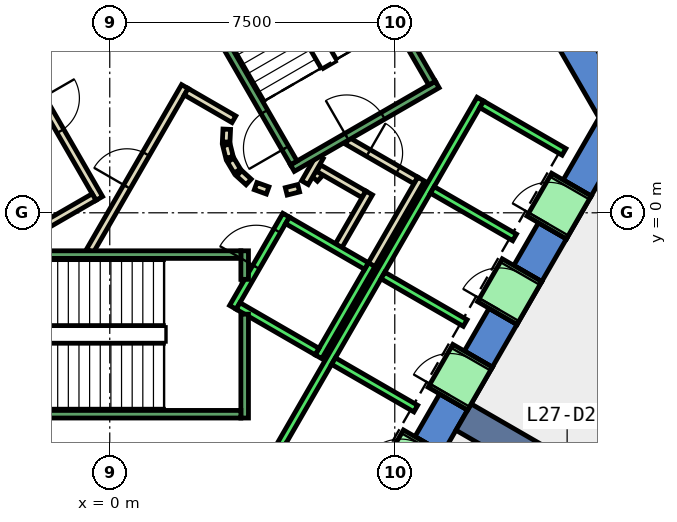
"""IFC4 building model, lengths in metres.
Left out: names, types, materials, properties, quantities, classifications, styles, units other than length and angle.
Written with IfcOpenShell. Run it as: python <this file> out.ifc"""

import sys

from ifc_helpers import new_model, si_unit, direction, frame, frame_2d, origin, place, context, subcontext, project, spatial, polyline, rectangle, outline, extrude, element, fill, save


model = new_model("IFC4")
c1 = context("Model", 3, precision=1e-05, world=origin(), true_north=direction((0.0, 1.0)))
c2 = subcontext(c1, "Body", "Model", "MODEL_VIEW")
j1 = project(units=[si_unit("LENGTHUNIT", "METRE"), si_unit("PLANEANGLEUNIT", "RADIAN")], contexts=[c1])
p1 = place(None, origin())
s1 = spatial("IfcSite", under=j1, at=p1, CompositionType="ELEMENT")
p2 = place(p1, origin())
s2 = spatial("IfcBuilding", under=s1, at=p2, CompositionType="ELEMENT")
p3 = place(p2, frame((0.0, 0.0, 124.4)))
s3 = spatial("IfcBuildingStorey", under=s2, at=p3, CompositionType="ELEMENT", Elevation=124.4)
p4 = place(p3, frame((0.0, 0.0, -0.4)))
e1 = element("IfcWall", 1, at=p4, inside=s3, PredefinedType="SHEAR", context=c2, shape_type="SweptSolid", body=[
    extrude(outline(polyline([(8.517, 11.748), (7.781, 11.323), (12.875, 2.5), (13.856, 2.5), (8.517, 11.748)])), origin(), (0.0, 0.0, 1.0), 4.2),
])
p5 = place(p3, frame((0.0, 0.0, -0.4)))
e2 = element("IfcWall", 2, at=p5, inside=s3, PredefinedType="SHEAR", context=c2, shape_type="SweptSolid", body=[
    extrude(outline(polyline([(9.417, -5.189), (8.681, -4.764), (8.031, -5.889), (8.767, -6.314), (9.417, -5.189)])), origin(), (0.0, 0.0, 1.0), 4.2),
])
p6 = place(p3, frame((0.0, 0.0, -0.4)))
e3 = element("IfcWall", 3, at=p6, inside=s3, PredefinedType="SHEAR", context=c2, shape_type="SweptSolid", body=[
    extrude(outline(polyline([(10.717, -2.937), (9.981, -2.512), (9.331, -3.638), (10.067, -4.063), (10.717, -2.937)])), origin(), (0.0, 0.0, 1.0), 4.2),
])
p7 = place(p3, frame((0.0, 0.0, -0.4)))
e4 = element("IfcWall", 4, at=p7, inside=s3, PredefinedType="SHEAR", context=c2, shape_type="SweptSolid", body=[
    extrude(outline(polyline([(12.017, -0.686), (11.281, -0.261), (10.631, -1.386), (11.367, -1.811), (12.017, -0.686)])), origin(), (0.0, 0.0, 1.0), 4.2),
])
p8 = place(p3, frame((0.0, 0.0, -0.4)))
e5 = element("IfcWall", 5, at=p8, inside=s3, PredefinedType="SHEAR", context=c2, shape_type="SweptSolid", body=[
    extrude(outline(polyline([(11.931, 0.865), (12.667, 0.44), (13.856, 2.5), (12.875, 2.5), (11.931, 0.865)])), origin(), (0.0, 0.0, 1.0), 4.2),
])
p9 = place(p3, frame((0.0, 0.0, 3.6)))
e6 = element("IfcWall", 6, at=p9, inside=s3, PredefinedType="SHEAR", context=c2, shape_type="SweptSolid", body=[
    extrude(outline(polyline([(8.767, -6.314), (8.031, -5.889), (7.381, -7.015), (8.117, -7.44), (8.767, -6.314)])), origin(), (0.0, 0.0, 1.0), 0.2),
])
p10 = place(p3, frame((0.0, 0.0, 3.6)))
e7 = element("IfcWall", 7, at=p10, inside=s3, PredefinedType="SHEAR", context=c2, shape_type="SweptSolid", body=[
    extrude(outline(polyline([(10.067, -4.063), (9.331, -3.638), (8.681, -4.764), (9.417, -5.189), (10.067, -4.063)])), origin(), (0.0, 0.0, 1.0), 0.2),
])
p11 = place(p3, frame((0.0, 0.0, 3.6)))
e8 = element("IfcWall", 8, at=p11, inside=s3, PredefinedType="SHEAR", context=c2, shape_type="SweptSolid", body=[
    extrude(outline(polyline([(11.367, -1.811), (10.631, -1.386), (9.981, -2.512), (10.717, -2.937), (11.367, -1.811)])), origin(), (0.0, 0.0, 1.0), 0.2),
])
p12 = place(p3, frame((0.0, 0.0, 3.6)))
e9 = element("IfcWall", 9, at=p12, inside=s3, PredefinedType="SHEAR", context=c2, shape_type="SweptSolid", body=[
    extrude(outline(polyline([(12.667, 0.44), (11.931, 0.865), (11.281, -0.261), (12.017, -0.686), (12.667, 0.44)])), origin(), (0.0, 0.0, 1.0), 0.2),
])
p13 = place(p3, frame((9.31, -5.375, -0.4), z_axis=(0.0, 0.0, 1.0), x_axis=(0.866017533419, -0.500013631625, 0.0)))
e10 = element("IfcWall", 10, at=p13, inside=s3, PredefinedType="SHEAR", context=c2, shape_type="SweptSolid", body=[
    extrude(rectangle(XDim=9.0, YDim=0.8, at=frame_2d((4.5, 0.0))), origin(), (0.0, 0.0, 1.0), 4.2),
])
p14 = place(p3, frame((5.39, 0.898, 0.0), z_axis=(0.0, 0.0, 1.0), x_axis=(0.673828488714, 0.738887791073, 0.0)))
e11 = element("IfcWall", 11, at=p14, inside=s3, PredefinedType="PARTITIONING", context=c2, shape_type="SweptSolid", body=[
    extrude(rectangle(XDim=0.263, YDim=0.2, at=frame_2d((0.131, 0.0))), origin(), (0.0, 0.0, 1.0), 3.8),
])
p15 = place(p3, frame((5.499, 1.172, 0.0), z_axis=(0.0, 0.0, 1.0), x_axis=(0.866333505267, -0.499465972466, 0.0)))
e12 = element("IfcWall", 12, at=p15, inside=s3, PredefinedType="PARTITIONING", context=c2, shape_type="SweptSolid", body=[
    extrude(rectangle(XDim=1.374, YDim=0.2, at=frame_2d((0.687, 0.0))), origin(), (0.0, 0.0, 1.0), 3.8),
])
p16 = place(p3, frame((6.826, 0.522, 0.0), z_axis=(0.0, 0.0, 1.0), x_axis=(-0.500016722714, -0.866015748706, 0.0)))
e13 = element("IfcWall", 13, at=p16, inside=s3, PredefinedType="PARTITIONING", context=c2, shape_type="SweptSolid", body=[
    extrude(rectangle(XDim=1.7, YDim=0.2, at=frame_2d((0.85, 0.0))), origin(), (0.0, 0.0, 1.0), 3.8),
])
p17 = place(p3, frame((6.25, 1.894, 0.0), z_axis=(0.0, 0.0, 1.0), x_axis=(0.866043184279, -0.499969202016, 0.0)))
e14 = element("IfcWall", 14, at=p17, inside=s3, PredefinedType="PARTITIONING", context=c2, shape_type="SweptSolid", body=[
    extrude(rectangle(XDim=2.084, YDim=0.2, at=frame_2d((1.042, 0.0))), origin(), (0.0, 0.0, 1.0), 3.8),
])
p18 = place(p17, frame((0.642, 0.0, 0.0)))
e15 = element("IfcOpeningElement", 15, at=p18, cuts=e14, PredefinedType="OPENING", context=c2, shape_type="SweptSolid", body=[
    extrude(rectangle(XDim=0.9, YDim=2.1, at=frame_2d((0.45, 1.05))), frame((0.0, 0.11, 0.0), z_axis=(0.0, -1.0, 0.0), x_axis=(1.0, 0.0, 0.0)), (0.0, 0.0, 1.0), 0.22),
])
p19 = place(p3, frame((8.192, 0.888, 0.0), z_axis=(0.0, 0.0, 1.0), x_axis=(-0.499940625693, -0.866059680843, 0.0)))
e16 = element("IfcWall", 16, at=p19, inside=s3, PredefinedType="PARTITIONING", context=c2, shape_type="SweptSolid", body=[
    extrude(rectangle(XDim=2.68, YDim=0.2, at=frame_2d((1.34, 0.0))), origin(), (0.0, 0.0, 1.0), 3.8),
])
p20 = place(p3, frame((5.135, 0.793, 0.0), z_axis=(0.0, 0.0, 1.0), x_axis=(0.499526442893, 0.866298639529, 0.0)))
e17 = element("IfcWall", 17, at=p20, inside=s3, PredefinedType="PARTITIONING", context=c2, shape_type="SweptSolid", body=[
    extrude(rectangle(XDim=0.791, YDim=0.2, at=frame_2d((0.396, 0.0))), origin(), (0.0, 0.0, 1.0), 3.8),
])
p21 = place(p3, frame((-0.52, -1.0, 0.0), z_axis=(0.0, 0.0, 1.0), x_axis=(0.50011622646, 0.865958290007, 0.0)))
e18 = element("IfcWall", 18, at=p21, inside=s3, PredefinedType="PARTITIONING", context=c2, shape_type="SweptSolid", body=[
    extrude(rectangle(XDim=4.991, YDim=0.2, at=frame_2d((2.496, 0.0))), origin(), (0.0, 0.0, 1.0), 3.8),
])
p22 = place(p21, frame((1.945, 0.0, 0.0)))
e19 = element("IfcOpeningElement", 19, at=p22, cuts=e18, PredefinedType="OPENING", context=c2, shape_type="SweptSolid", body=[
    extrude(rectangle(XDim=1.0, YDim=2.1, at=frame_2d((0.5, 1.05))), frame((0.0, 0.11, 0.0), z_axis=(0.0, -1.0, 0.0), x_axis=(1.0, 0.0, 0.0)), (0.0, 0.0, 1.0), 0.22),
])
p23 = place(p3, frame((2.012, 3.186, 0.0), z_axis=(0.0, 0.0, 1.0), x_axis=(0.865891012941, -0.500232699559, 0.0)))
e20 = element("IfcWall", 20, at=p23, inside=s3, PredefinedType="PARTITIONING", context=c2, shape_type="SweptSolid", body=[
    extrude(rectangle(XDim=1.449, YDim=0.2, at=frame_2d((0.725, 0.0))), origin(), (0.0, 0.0, 1.0), 3.8),
])
p24 = place(p3, frame((3.079, 2.199, 0.0), z_axis=(0.0, 0.0, 1.0), x_axis=(-0.047771483479, -0.998858290933, 0.0)))
e21 = element("IfcWall", 21, at=p24, inside=s3, PredefinedType="PARTITIONING", context=c2, shape_type="SweptSolid", body=[
    extrude(rectangle(XDim=0.337, YDim=0.2, at=frame_2d((0.169, 0.0))), origin(), (0.0, 0.0, 1.0), 3.8),
])
p25 = place(p3, frame((3.07, 1.786, 0.0), z_axis=(0.0, 0.0, 1.0), x_axis=(0.242705583207, -0.970099994784, 0.0)))
e22 = element("IfcWall", 22, at=p25, inside=s3, PredefinedType="PARTITIONING", context=c2, shape_type="SweptSolid", body=[
    extrude(rectangle(XDim=0.338, YDim=0.2, at=frame_2d((0.169, 0.0))), origin(), (0.0, 0.0, 1.0), 3.8),
])
for number, where, z_axis, x_axis in (
    (23, (3.182, 1.388, 0.0), (0.0, 0.0, 1.0), (0.512, -0.859, 0.0)),
    (24, (3.404, 1.039, 0.0), (0.0, 0.0, 1.0), (0.74, -0.672, 0.0)),
):
    element("IfcWall", number, at=place(p3, frame(where, z_axis=z_axis, x_axis=x_axis)), inside=s3, PredefinedType="PARTITIONING", context=c2, shape_type="SweptSolid", body=[
        extrude(rectangle(XDim=0.338, YDim=0.2, at=frame_2d((0.169, 0.0))), origin(), (0.0, 0.0, 1.0), 3.8),
    ])
p26 = place(p3, frame((3.838, 0.702, 0.0), z_axis=(0.0, 0.0, 1.0), x_axis=(0.941035081519, -0.338308993895, 0.0)))
e25 = element("IfcWall", 25, at=p26, inside=s3, PredefinedType="PARTITIONING", context=c2, shape_type="SweptSolid", body=[
    extrude(rectangle(XDim=0.337, YDim=0.2, at=frame_2d((0.168, 0.0))), origin(), (0.0, 0.0, 1.0), 3.8),
])
p27 = place(p3, frame((4.644, 0.564, 0.0), z_axis=(0.0, 0.0, 1.0), x_axis=(0.969929076366, 0.243387729394, 0.0)))
e26 = element("IfcWall", 26, at=p27, inside=s3, PredefinedType="PARTITIONING", context=c2, shape_type="SweptSolid", body=[
    extrude(rectangle(XDim=0.337, YDim=0.2, at=frame_2d((0.168, 0.0))), origin(), (0.0, 0.0, 1.0), 3.8),
])
p28 = place(p3, frame((-2.771, 4.7, 0.0), z_axis=(0.0, 0.0, 1.0), x_axis=(0.499969479948, -0.866043023828, 0.0)))
e27 = element("IfcWall", 27, at=p28, inside=s3, PredefinedType="PARTITIONING", context=c2, shape_type="SweptSolid", body=[
    extrude(rectangle(XDim=4.99, YDim=0.2, at=frame_2d((2.495, 0.0))), origin(), (0.0, 0.0, 1.0), 3.8),
])
p29 = place(p28, frame((1.945, 0.0, 0.0)))
e28 = element("IfcOpeningElement", 28, at=p29, cuts=e27, PredefinedType="OPENING", context=c2, shape_type="SweptSolid", body=[
    extrude(rectangle(XDim=1.0, YDim=2.1, at=frame_2d((0.5, 1.05))), frame((0.0, 0.11, 0.0), z_axis=(0.0, -1.0, 0.0), x_axis=(1.0, 0.0, 0.0)), (0.0, 0.0, 1.0), 0.22),
])
p30 = place(p3, frame((-0.412, 0.414, 0.0), z_axis=(0.0, 0.0, 1.0), x_axis=(-0.866017369001, -0.500013916395, 0.0)))
e29 = element("IfcWall", 29, at=p30, inside=s3, PredefinedType="PARTITIONING", context=c2, shape_type="SweptSolid", body=[
    extrude(rectangle(XDim=1.45, YDim=0.2, at=frame_2d((0.725, 0.0))), origin(), (0.0, 0.0, 1.0), 3.8),
])
p31 = place(p3, frame((16.32, -0.832, 0.0), z_axis=(0.0, 0.0, 1.0), x_axis=(-0.499951642806, -0.866053321023, 0.0)))
e30 = element("IfcWall", 30, at=p31, inside=s3, PredefinedType="PARTITIONING", context=c2, shape_type="SweptSolid", body=[
    extrude(rectangle(XDim=7.039, YDim=0.2, at=frame_2d((3.52, 0.0))), origin(), (0.0, 0.0, 1.0), 3.8),
])
p32 = place(p3, frame((3.24, -2.488, 0.0), z_axis=(0.0, 0.0, 1.0), x_axis=(0.49994636267, 0.866056369097, 0.0)))
e31 = element("IfcWall", 31, at=p32, inside=s3, PredefinedType="STANDARD", context=c2, shape_type="SweptSolid", body=[
    extrude(rectangle(XDim=2.8, YDim=0.2, at=frame_2d((1.4, 0.0))), origin(), (0.0, 0.0, 1.0), 3.8),
])
p33 = place(p32, frame((1.225, 0.0, 0.0)))
e32 = element("IfcOpeningElement", 32, at=p33, cuts=e31, PredefinedType="OPENING", context=c2, shape_type="SweptSolid", body=[
    extrude(rectangle(XDim=1.1, YDim=2.1, at=frame_2d((0.55, 1.05))), frame((0.0, 0.11, 0.0), z_axis=(0.0, -1.0, 0.0), x_axis=(1.0, 0.0, 0.0)), (0.0, 0.0, 1.0), 0.22),
])
p34 = place(p3, frame((5.492, -3.788, 0.0), z_axis=(0.0, 0.0, 1.0), x_axis=(0.500011755427, 0.866018616679, 0.0)))
e33 = element("IfcWall", 33, at=p34, inside=s3, PredefinedType="STANDARD", context=c2, shape_type="SweptSolid", body=[
    extrude(rectangle(XDim=2.8, YDim=0.2, at=frame_2d((1.4, 0.0))), origin(), (0.0, 0.0, 1.0), 3.8),
])
p35 = place(p3, frame((3.377, -2.452, 0.0), z_axis=(0.0, 0.0, 1.0), x_axis=(0.865955154139, -0.50012165622, 0.0)))
e34 = element("IfcWall", 34, at=p35, inside=s3, PredefinedType="STANDARD", context=c2, shape_type="SweptSolid", body=[
    extrude(rectangle(XDim=2.4, YDim=0.2, at=frame_2d((1.2, 0.0))), origin(), (0.0, 0.0, 1.0), 3.8),
])
p36 = place(p3, frame((4.677, -0.2, 0.0), z_axis=(0.0, 0.0, 1.0), x_axis=(0.865973769406, -0.500089422704, 0.0)))
e35 = element("IfcWall", 35, at=p36, inside=s3, PredefinedType="STANDARD", context=c2, shape_type="SweptSolid", body=[
    extrude(rectangle(XDim=2.399, YDim=0.2, at=frame_2d((1.2, 0.0))), origin(), (0.0, 0.0, 1.0), 3.8),
])
p37 = place(p3, frame((4.451, -6.19, 0.0), z_axis=(0.0, 0.0, 1.0), x_axis=(0.50000090737, 0.866024879913, 0.0)))
e36 = element("IfcWall", 36, at=p37, inside=s3, PredefinedType="STANDARD", context=c2, shape_type="SweptSolid", body=[
    extrude(rectangle(XDim=10.6, YDim=0.2, at=frame_2d((5.3, 0.0))), origin(), (0.0, 0.0, 1.0), 3.8),
])
for number, where, z_axis, x_axis in (
    (37, (5.888, -3.902, 0.0), (0.0, 0.0, 1.0), (0.866, -0.5, 0.0)),
    (38, (7.188, -1.65, 0.0), (0.0, 0.0, 1.0), (0.866, -0.5, 0.0)),
    (39, (8.488, 0.602, 0.0), (0.0, 0.0, 1.0), (0.866, -0.5, 0.0)),
):
    element("IfcWall", number, at=place(p3, frame(where, z_axis=z_axis, x_axis=x_axis)), inside=s3, PredefinedType="STANDARD", context=c2, shape_type="SweptSolid", body=[
        extrude(rectangle(XDim=2.5, YDim=0.2, at=frame_2d((1.25, 0.0))), origin(), (0.0, 0.0, 1.0), 3.8),
    ])
p38 = place(p3, frame((9.788, 2.853, 0.0), z_axis=(0.0, 0.0, 1.0), x_axis=(0.865998541277, -0.500046524342, 0.0)))
e40 = element("IfcWall", 40, at=p38, inside=s3, PredefinedType="STANDARD", context=c2, shape_type="SweptSolid", body=[
    extrude(rectangle(XDim=2.5, YDim=0.2, at=frame_2d((1.25, 0.0))), origin(), (0.0, 0.0, 1.0), 3.8),
])
p39 = place(p3, frame((7.598, -7.14, 0.0), z_axis=(0.0, 0.0, 1.0), x_axis=(0.500362116554, 0.865816234728, 0.0)))
e41 = element("IfcWall", 41, at=p39, inside=s3, PredefinedType="STANDARD", context=c2, shape_type="SweptSolid", body=[
    extrude(rectangle(XDim=1.299, YDim=1.2, at=frame_2d((0.65, 0.0))), origin(), (0.0, 0.0, 1.0), 2.4),
])
p40 = place(p39, frame((0.1, 0.0, 0.0)))
e42 = element("IfcOpeningElement", 42, at=p40, cuts=e41, PredefinedType="OPENING", context=c2, shape_type="SweptSolid", body=[
    extrude(rectangle(XDim=1.1, YDim=2.3, at=frame_2d((0.55, 1.15))), frame((0.0, 0.61, 0.0), z_axis=(0.0, -1.0, 0.0), x_axis=(1.0, 0.0, 0.0)), (0.0, 0.0, 1.0), 1.22),
])
p41 = place(p3, frame((8.898, -4.889, 0.0), z_axis=(0.0, 0.0, 1.0), x_axis=(0.500036693733, 0.866004217611, 0.0)))
e43 = element("IfcWall", 43, at=p41, inside=s3, PredefinedType="STANDARD", context=c2, shape_type="SweptSolid", body=[
    extrude(rectangle(XDim=1.3, YDim=1.2, at=frame_2d((0.65, 0.0))), origin(), (0.0, 0.0, 1.0), 2.4),
])
p42 = place(p41, frame((0.1, 0.0, 0.0)))
e44 = element("IfcOpeningElement", 44, at=p42, cuts=e43, PredefinedType="OPENING", context=c2, shape_type="SweptSolid", body=[
    extrude(rectangle(XDim=1.1, YDim=2.3, at=frame_2d((0.55, 1.15))), frame((0.0, 0.61, 0.0), z_axis=(0.0, -1.0, 0.0), x_axis=(1.0, 0.0, 0.0)), (0.0, 0.0, 1.0), 1.22),
])
p43 = place(p3, frame((10.198, -2.637, 0.0), z_axis=(0.0, 0.0, 1.0), x_axis=(0.49989585183, 0.866085525409, 0.0)))
e45 = element("IfcWall", 45, at=p43, inside=s3, PredefinedType="STANDARD", context=c2, shape_type="SweptSolid", body=[
    extrude(rectangle(XDim=1.3, YDim=1.2, at=frame_2d((0.65, 0.0))), origin(), (0.0, 0.0, 1.0), 2.4),
])
p44 = place(p43, frame((0.1, 0.0, 0.0)))
e46 = element("IfcOpeningElement", 46, at=p44, cuts=e45, PredefinedType="OPENING", context=c2, shape_type="SweptSolid", body=[
    extrude(rectangle(XDim=1.1, YDim=2.3, at=frame_2d((0.55, 1.15))), frame((0.0, 0.61, 0.0), z_axis=(0.0, -1.0, 0.0), x_axis=(1.0, 0.0, 0.0)), (0.0, 0.0, 1.0), 1.22),
])
p45 = place(p3, frame((11.498, -0.385, 0.0), z_axis=(0.0, 0.0, 1.0), x_axis=(0.500221244143, 0.865897630733, 0.0)))
e47 = element("IfcWall", 47, at=p45, inside=s3, PredefinedType="STANDARD", context=c2, shape_type="SweptSolid", body=[
    extrude(rectangle(XDim=1.299, YDim=1.2, at=frame_2d((0.65, 0.0))), origin(), (0.0, 0.0, 1.0), 2.4),
])
p46 = place(p45, frame((0.1, 0.0, 0.0)))
e48 = element("IfcOpeningElement", 48, at=p46, cuts=e47, PredefinedType="OPENING", context=c2, shape_type="SweptSolid", body=[
    extrude(rectangle(XDim=1.1, YDim=2.3, at=frame_2d((0.55, 1.15))), frame((0.0, 0.61, 0.0), z_axis=(0.0, -1.0, 0.0), x_axis=(1.0, 0.0, 0.0)), (0.0, 0.0, 1.0), 1.22),
])
p47 = place(p3, frame((3.55, -2.667, 0.0), z_axis=(0.0, 0.0, 1.0), x_axis=(0.0, -1.0, 0.0)))
e49 = element("IfcWall", 49, at=p47, inside=s3, PredefinedType="STANDARD", context=c2, shape_type="SweptSolid", body=[
    extrude(rectangle(XDim=2.733, YDim=0.2, at=frame_2d((1.366, 0.0))), origin(), (0.0, 0.0, 1.0), 3.8),
])
p48 = place(p3, frame((3.55, -1.0, 0.0), z_axis=(0.0, 0.0, 1.0), x_axis=(0.0, -1.0, 0.0)))
e50 = element("IfcWall", 50, at=p48, inside=s3, PredefinedType="STANDARD", context=c2, shape_type="SweptSolid", body=[
    extrude(rectangle(XDim=0.751, YDim=0.2, at=frame_2d((0.375, 0.0))), origin(), (0.0, 0.0, 1.0), 3.8),
])
p49 = place(p3, frame((-3.45, -1.1, 0.0), z_axis=(0.0, 0.0, 1.0), x_axis=(1.0, 0.0, 0.0)))
e51 = element("IfcWall", 51, at=p49, inside=s3, PredefinedType="STANDARD", context=c2, shape_type="SweptSolid", body=[
    extrude(rectangle(XDim=6.9, YDim=0.2, at=frame_2d((3.45, 0.0))), origin(), (0.0, 0.0, 1.0), 3.8),
])
p50 = place(p49, frame((0.45, 0.0, 0.0)))
e52 = element("IfcOpeningElement", 52, at=p50, cuts=e51, PredefinedType="OPENING", context=c2, shape_type="SweptSolid", body=[
    extrude(rectangle(XDim=1.1, YDim=2.2, at=frame_2d((0.55, 1.1))), frame((0.0, 0.11, 0.0), z_axis=(0.0, -1.0, 0.0), x_axis=(1.0, 0.0, 0.0)), (0.0, 0.0, 1.0), 0.22),
])
p51 = place(p3, frame((-3.45, -5.3, 0.0), z_axis=(0.0, 0.0, 1.0), x_axis=(1.0, 0.0, 0.0)))
e53 = element("IfcWall", 53, at=p51, inside=s3, PredefinedType="STANDARD", context=c2, shape_type="SweptSolid", body=[
    extrude(rectangle(XDim=6.9, YDim=0.2, at=frame_2d((3.45, 0.0))), origin(), (0.0, 0.0, 1.0), 3.8),
])
p52 = place(p3, frame((4.806, 1.176, 0.0), z_axis=(0.0, 0.0, 1.0), x_axis=(0.866059941101, 0.499940174841, 0.0)))
e54 = element("IfcWall", 54, at=p52, inside=s3, PredefinedType="STANDARD", context=c2, shape_type="SweptSolid", body=[
    extrude(rectangle(XDim=4.4, YDim=0.2, at=frame_2d((2.2, 0.0))), origin(), (0.0, 0.0, 1.0), 3.8),
])
p53 = place(p52, frame((1.65, 0.0, 0.0)))
e55 = element("IfcOpeningElement", 55, at=p53, cuts=e54, PredefinedType="OPENING", context=c2, shape_type="SweptSolid", body=[
    extrude(rectangle(XDim=1.1, YDim=2.2, at=frame_2d((0.55, 1.1))), frame((0.0, 0.11, 0.0), z_axis=(0.0, -1.0, 0.0), x_axis=(1.0, 0.0, 0.0)), (0.0, 0.0, 1.0), 0.22),
])
p54 = place(p3, frame((4.843, 1.312, 0.0), z_axis=(0.0, 0.0, 1.0), x_axis=(-0.499963383562, 0.866046543262, 0.0)))
e56 = element("IfcWall", 56, at=p54, inside=s3, PredefinedType="STANDARD", context=c2, shape_type="SweptSolid", body=[
    extrude(rectangle(XDim=6.9, YDim=0.2, at=frame_2d((3.45, 0.0))), origin(), (0.0, 0.0, 1.0), 3.8),
])
p55 = place(p54, frame((0.45, 0.0, 0.0)))
e57 = element("IfcOpeningElement", 57, at=p55, cuts=e56, PredefinedType="OPENING", context=c2, shape_type="SweptSolid", body=[
    extrude(rectangle(XDim=1.1, YDim=2.2, at=frame_2d((0.55, 1.1))), frame((0.0, 0.11, 0.0), z_axis=(0.0, -1.0, 0.0), x_axis=(1.0, 0.0, 0.0)), (0.0, 0.0, 1.0), 0.22),
])
p56 = place(p3, frame((8.48, 3.412, 0.0), z_axis=(0.0, 0.0, 1.0), x_axis=(-0.499978703459, 0.866037698999, 0.0)))
e58 = element("IfcWall", 58, at=p56, inside=s3, PredefinedType="STANDARD", context=c2, shape_type="SweptSolid", body=[
    extrude(rectangle(XDim=6.9, YDim=0.2, at=frame_2d((3.45, 0.0))), origin(), (0.0, 0.0, 1.0), 3.8),
])
p57 = place(p3, frame((-1.393, 7.288, 0.0), z_axis=(0.0, 0.0, 1.0), x_axis=(-0.499963383562, -0.866046543262, 0.0)))
e59 = element("IfcWall", 59, at=p57, inside=s3, PredefinedType="STANDARD", context=c2, shape_type="SweptSolid", body=[
    extrude(rectangle(XDim=6.9, YDim=0.2, at=frame_2d((3.45, 0.0))), origin(), (0.0, 0.0, 1.0), 3.8),
])
p58 = place(p57, frame((0.45, 0.0, 0.0)))
e60 = element("IfcOpeningElement", 60, at=p58, cuts=e59, PredefinedType="OPENING", context=c2, shape_type="SweptSolid", body=[
    extrude(rectangle(XDim=1.1, YDim=2.2, at=frame_2d((0.55, 1.1))), frame((0.0, 0.11, 0.0), z_axis=(0.0, -1.0, 0.0), x_axis=(1.0, 0.0, 0.0)), (0.0, 0.0, 1.0), 0.22),
])
p59 = place(p22, origin())
e61 = element("IfcDoor", 61, at=p59, inside=s3, OperationType="SINGLE_SWING_LEFT", PredefinedType="DOOR", context=c2, shape_type="SweptSolid", body=[
    extrude(rectangle(XDim=1.0, YDim=2.1, at=frame_2d((0.5, 1.05))), frame((0.0, 0.025, 0.0), z_axis=(0.0, -1.0, 0.0), x_axis=(1.0, 0.0, 0.0)), (0.0, 0.0, 1.0), 0.05),
])
fill(e19, e61)
p60 = place(p29, origin())
e62 = element("IfcDoor", 62, at=p60, inside=s3, OperationType="SINGLE_SWING_RIGHT", PredefinedType="DOOR", context=c2, shape_type="SweptSolid", body=[
    extrude(rectangle(XDim=1.0, YDim=2.1, at=frame_2d((0.5, 1.05))), frame((0.0, 0.025, 0.0), z_axis=(0.0, -1.0, 0.0), x_axis=(1.0, 0.0, 0.0)), (0.0, 0.0, 1.0), 0.05),
])
fill(e28, e62)
p61 = place(p18, origin())
e63 = element("IfcDoor", 63, at=p61, inside=s3, OperationType="SINGLE_SWING_LEFT", PredefinedType="DOOR", context=c2, shape_type="SweptSolid", body=[
    extrude(rectangle(XDim=0.9, YDim=2.1, at=frame_2d((0.45, 1.05))), frame((0.0, 0.025, 0.0), z_axis=(0.0, -1.0, 0.0), x_axis=(1.0, 0.0, 0.0)), (0.0, 0.0, 1.0), 0.05),
])
fill(e15, e63)
p62 = place(p42, origin())
e64 = element("IfcDoor", 64, at=p62, inside=s3, OperationType="SLIDING_TO_LEFT", PredefinedType="DOOR", context=c2, shape_type="SweptSolid", body=[
    extrude(rectangle(XDim=1.1, YDim=2.3, at=frame_2d((0.55, 1.15))), frame((0.0, 0.025, 0.0), z_axis=(0.0, -1.0, 0.0), x_axis=(1.0, 0.0, 0.0)), (0.0, 0.0, 1.0), 0.05),
])
fill(e44, e64)
p63 = place(p44, origin())
e65 = element("IfcDoor", 65, at=p63, inside=s3, OperationType="SLIDING_TO_LEFT", PredefinedType="DOOR", context=c2, shape_type="SweptSolid", body=[
    extrude(rectangle(XDim=1.1, YDim=2.3, at=frame_2d((0.55, 1.15))), frame((0.0, 0.025, 0.0), z_axis=(0.0, -1.0, 0.0), x_axis=(1.0, 0.0, 0.0)), (0.0, 0.0, 1.0), 0.05),
])
fill(e46, e65)
p64 = place(p46, origin())
e66 = element("IfcDoor", 66, at=p64, inside=s3, OperationType="SLIDING_TO_LEFT", PredefinedType="DOOR", context=c2, shape_type="SweptSolid", body=[
    extrude(rectangle(XDim=1.1, YDim=2.3, at=frame_2d((0.55, 1.15))), frame((0.0, 0.025, 0.0), z_axis=(0.0, -1.0, 0.0), x_axis=(1.0, 0.0, 0.0)), (0.0, 0.0, 1.0), 0.05),
])
fill(e48, e66)
p65 = place(p33, origin())
e67 = element("IfcDoor", 67, at=p65, inside=s3, OperationType="SLIDING_TO_LEFT", PredefinedType="DOOR", context=c2, shape_type="SweptSolid", body=[
    extrude(rectangle(XDim=1.1, YDim=2.1, at=frame_2d((0.55, 1.05))), frame((0.0, 0.025, 0.0), z_axis=(0.0, -1.0, 0.0), x_axis=(1.0, 0.0, 0.0)), (0.0, 0.0, 1.0), 0.05),
])
fill(e32, e67)
p66 = place(p55, origin())
e68 = element("IfcDoor", 68, at=p66, inside=s3, OperationType="SINGLE_SWING_LEFT", PredefinedType="DOOR", context=c2, shape_type="SweptSolid", body=[
    extrude(rectangle(XDim=1.1, YDim=2.2, at=frame_2d((0.55, 1.1))), frame((0.0, 0.025, 0.0), z_axis=(0.0, -1.0, 0.0), x_axis=(1.0, 0.0, 0.0)), (0.0, 0.0, 1.0), 0.05),
])
fill(e57, e68)
p67 = place(p53, origin())
e69 = element("IfcDoor", 69, at=p67, inside=s3, OperationType="SINGLE_SWING_LEFT", PredefinedType="DOOR", context=c2, shape_type="SweptSolid", body=[
    extrude(rectangle(XDim=1.1, YDim=2.2, at=frame_2d((0.55, 1.1))), frame((0.0, 0.025, 0.0), z_axis=(0.0, -1.0, 0.0), x_axis=(1.0, 0.0, 0.0)), (0.0, 0.0, 1.0), 0.05),
])
fill(e55, e69)
save(model, sys.argv[1])
